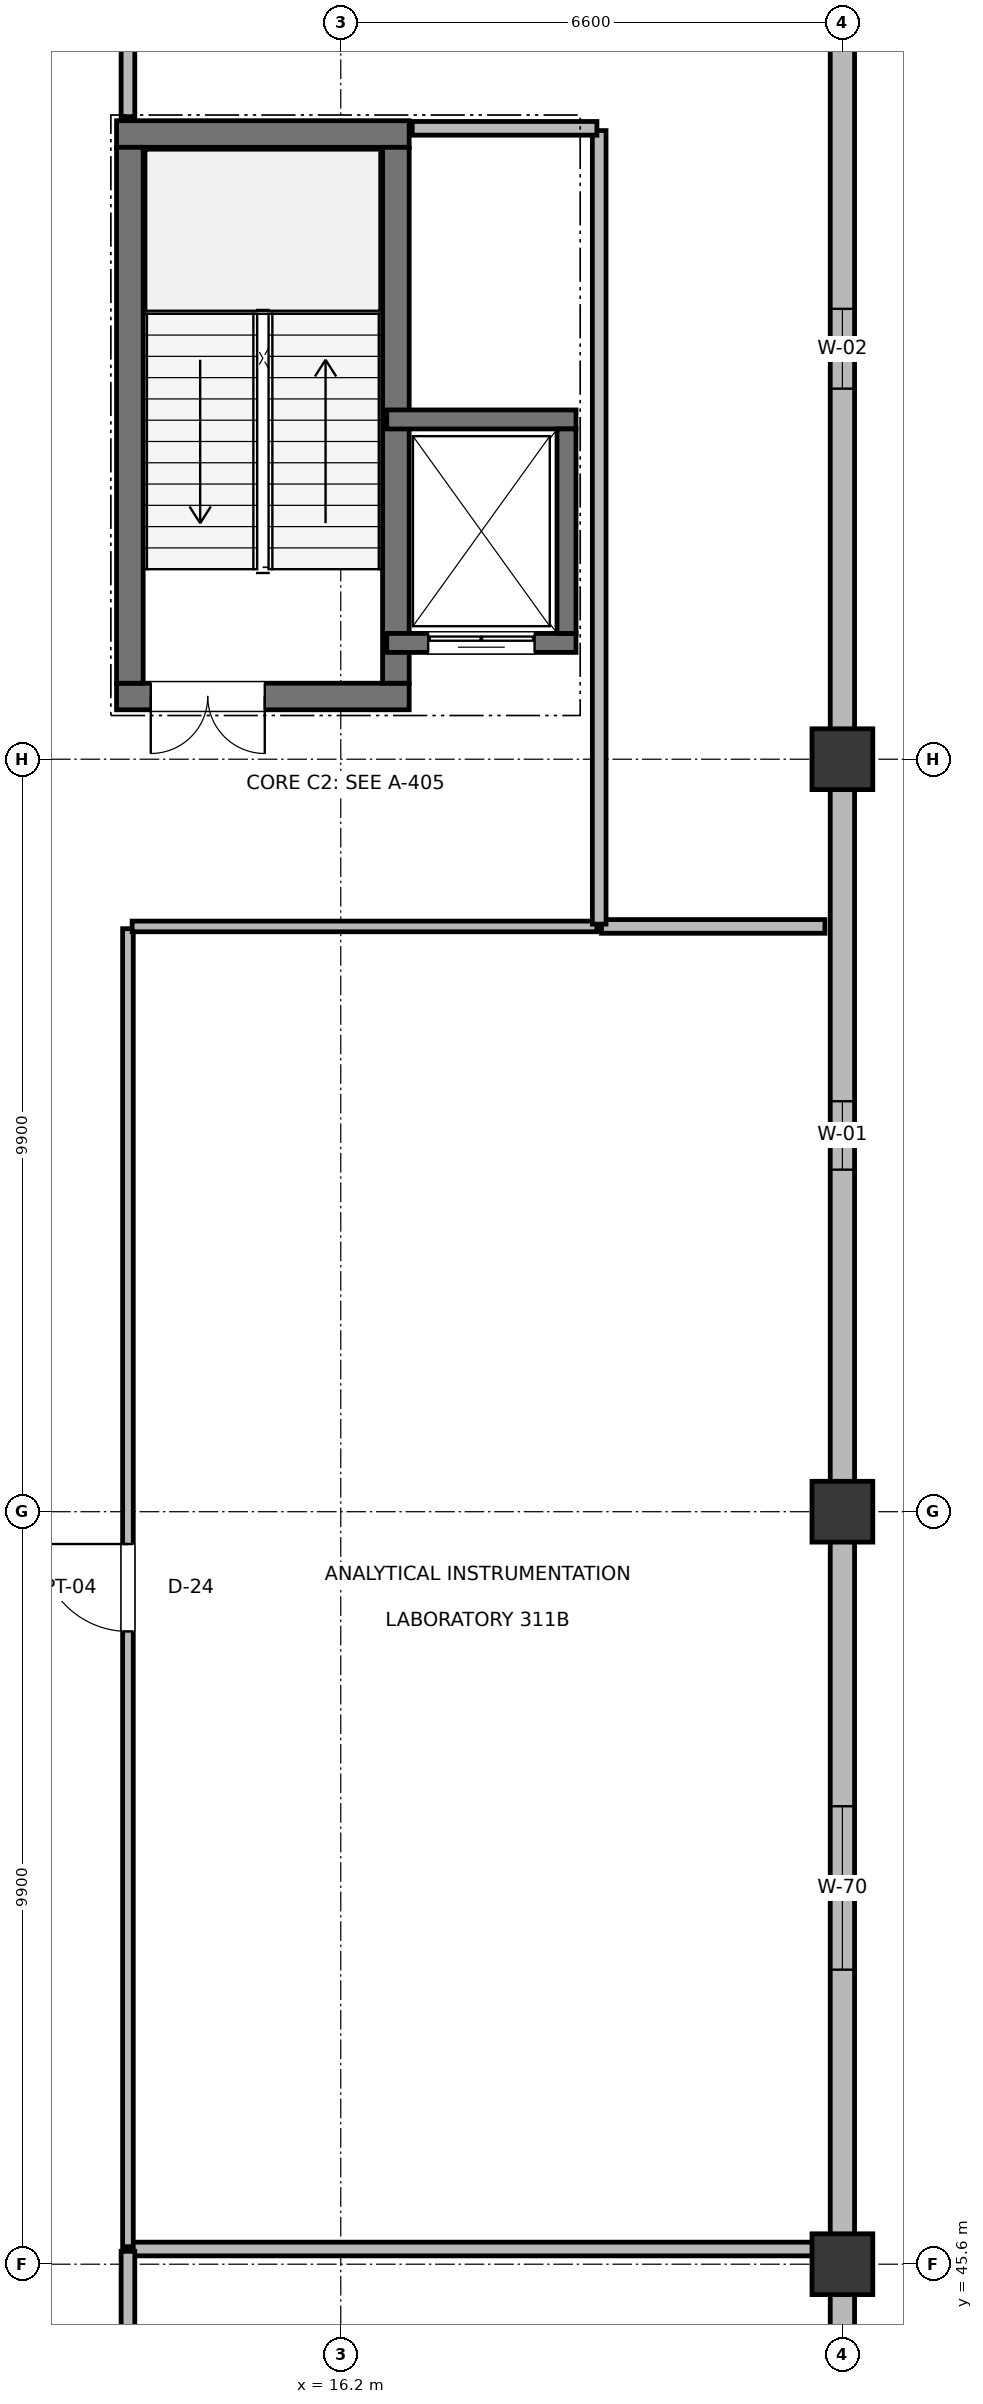
"""IFC4 building model, lengths in metres.
Left out: names, types, materials, properties, quantities, classifications, styles, units other than length and angle.
Written with IfcOpenShell. Run it as: python <this file> out.ifc"""

import sys

from ifc_helpers import new_model, si_unit, direction, frame, frame_2d, origin, origin_2d, place, context, subcontext, project, spatial, rectangle, extrude, element, fill, save


model = new_model("IFC4")
c1 = context("Model", 3, precision=1e-05, world=origin(), true_north=direction((0.0, 1.0)))
c2 = subcontext(c1, "Body", "Model", "MODEL_VIEW")
j1 = project(units=[si_unit("LENGTHUNIT", "METRE"), si_unit("PLANEANGLEUNIT", "RADIAN")], contexts=[c1])
p1 = place(None, origin())
s1 = spatial("IfcSite", under=j1, at=p1, CompositionType="ELEMENT")
p2 = place(p1, origin())
s2 = spatial("IfcBuilding", under=s1, at=p2, CompositionType="ELEMENT")
p3 = place(p2, frame((0.0, 0.0, 15.0)))
s3 = spatial("IfcBuildingStorey", under=s2, at=p3, CompositionType="ELEMENT", Elevation=15.0)
for number, where, z_axis, x_axis in (
    (1, (22.8, 45.6, 0.0), (0.0, 0.0, 1.0), (1.0, 0.0, 0.0)),
    (2, (22.8, 55.5, 0.0), (0.0, 0.0, 1.0), (1.0, 0.0, 0.0)),
    (3, (22.8, 65.4, 0.0), (0.0, 0.0, 1.0), (1.0, 0.0, 0.0)),
):
    element("IfcColumn", number, at=place(p3, frame(where, z_axis=z_axis, x_axis=x_axis)), inside=s3, PredefinedType="COLUMN", context=c2, shape_type="SweptSolid", body=[
        extrude(rectangle(XDim=0.8, YDim=0.8, at=origin_2d()), origin(), (0.0, 0.0, 1.0), 4.5),
    ])
p4 = place(p3, frame((22.8, 39.385, 0.0), z_axis=(0.0, 0.0, 1.0), x_axis=(0.0, 1.0, 0.0)))
e4 = element("IfcWall", 4, at=p4, inside=s3, PredefinedType="SOLIDWALL", context=c2, shape_type="SweptSolid", body=[
    extrude(rectangle(XDim=5.83, YDim=0.32, at=frame_2d((2.915, 0.0))), origin(), (0.0, 0.0, 1.0), 3.525),
])
p5 = place(p4, frame((1.84, 0.0, 0.9)))
e5 = element("IfcOpeningElement", 5, at=p5, cuts=e4, PredefinedType="OPENING", context=c2, shape_type="SweptSolid", body=[
    extrude(rectangle(XDim=2.15, YDim=1.15, at=frame_2d((1.075, 0.575))), frame((0.0, 0.17, 0.0), z_axis=(0.0, -1.0, 0.0), x_axis=(1.0, 0.0, 0.0)), (0.0, 0.0, 1.0), 0.34),
])
p6 = place(p3, frame((22.8, 45.985, 0.0), z_axis=(0.0, 0.0, 1.0), x_axis=(0.0, 1.0, 0.0)))
e6 = element("IfcWall", 6, at=p6, inside=s3, PredefinedType="SOLIDWALL", context=c2, shape_type="SweptSolid", body=[
    extrude(rectangle(XDim=9.13, YDim=0.32, at=frame_2d((4.565, 0.0))), origin(), (0.0, 0.0, 1.0), 3.325),
])
p7 = place(p6, frame((3.49, 0.0, 0.9)))
e7 = element("IfcOpeningElement", 7, at=p7, cuts=e6, PredefinedType="OPENING", context=c2, shape_type="SweptSolid", body=[
    extrude(rectangle(XDim=2.15, YDim=1.35, at=frame_2d((1.075, 0.675))), frame((0.0, 0.17, 0.0), z_axis=(0.0, -1.0, 0.0), x_axis=(1.0, 0.0, 0.0)), (0.0, 0.0, 1.0), 0.34),
])
p8 = place(p3, frame((22.8, 55.885, 0.0), z_axis=(0.0, 0.0, 1.0), x_axis=(0.0, 1.0, 0.0)))
e8 = element("IfcWall", 8, at=p8, inside=s3, PredefinedType="SOLIDWALL", context=c2, shape_type="SweptSolid", body=[
    extrude(rectangle(XDim=9.13, YDim=0.32, at=frame_2d((4.565, 0.0))), origin(), (0.0, 0.0, 1.0), 3.325),
])
p9 = place(p8, frame((4.115, 0.0, 0.9)))
e9 = element("IfcOpeningElement", 9, at=p9, cuts=e8, PredefinedType="OPENING", context=c2, shape_type="SweptSolid", body=[
    extrude(rectangle(XDim=0.9, YDim=1.8, at=frame_2d((0.45, 0.9))), frame((0.0, 0.17, 0.0), z_axis=(0.0, -1.0, 0.0), x_axis=(1.0, 0.0, 0.0)), (0.0, 0.0, 1.0), 0.34),
])
p10 = place(p3, frame((22.8, 65.785, 0.0), z_axis=(0.0, 0.0, 1.0), x_axis=(0.0, 1.0, 0.0)))
e10 = element("IfcWall", 10, at=p10, inside=s3, PredefinedType="SOLIDWALL", context=c2, shape_type="SweptSolid", body=[
    extrude(rectangle(XDim=10.03, YDim=0.32, at=frame_2d((5.015, 0.0))), origin(), (0.0, 0.0, 1.0), 3.325),
])
p11 = place(p10, frame((4.49, 0.0, 0.9)))
e11 = element("IfcOpeningElement", 11, at=p11, cuts=e10, PredefinedType="OPENING", context=c2, shape_type="SweptSolid", body=[
    extrude(rectangle(XDim=1.05, YDim=1.8, at=frame_2d((0.525, 0.9))), frame((0.0, 0.17, 0.0), z_axis=(0.0, -1.0, 0.0), x_axis=(1.0, 0.0, 0.0)), (0.0, 0.0, 1.0), 0.34),
])
p12 = place(p3, frame((13.25, 66.225, 0.0), z_axis=(0.0, 0.0, 1.0), x_axis=(1.0, 0.0, 0.0)))
e12 = element("IfcWall", 12, at=p12, inside=s3, PredefinedType="SHEAR", context=c2, shape_type="SweptSolid", body=[
    extrude(rectangle(XDim=3.85, YDim=0.35, at=frame_2d((1.925, 0.0))), origin(), (0.0, 0.0, 1.0), 4.28),
])
p13 = place(p12, frame((0.45, 0.0, 0.0)))
e13 = element("IfcOpeningElement", 13, at=p13, cuts=e12, PredefinedType="OPENING", context=c2, shape_type="SweptSolid", body=[
    extrude(rectangle(XDim=1.5, YDim=2.2, at=frame_2d((0.75, 1.1))), frame((0.0, 0.185, 0.0), z_axis=(0.0, -1.0, 0.0), x_axis=(1.0, 0.0, 0.0)), (0.0, 0.0, 1.0), 0.37),
])
p14 = place(p3, frame((13.25, 73.625, 0.0), z_axis=(0.0, 0.0, 1.0), x_axis=(1.0, 0.0, 0.0)))
e14 = element("IfcWall", 14, at=p14, inside=s3, PredefinedType="SHEAR", context=c2, shape_type="SweptSolid", body=[
    extrude(rectangle(XDim=3.85, YDim=0.35, at=frame_2d((1.925, 0.0))), origin(), (0.0, 0.0, 1.0), 4.28),
])
for number, where, z_axis, x_axis in (
    (15, (13.425, 66.4, 0.0), (0.0, 0.0, 1.0), (0.0, 1.0, 0.0)),
    (16, (16.925, 66.4, 0.0), (0.0, 0.0, 1.0), (0.0, 1.0, 0.0)),
):
    element("IfcWall", number, at=place(p3, frame(where, z_axis=z_axis, x_axis=x_axis)), inside=s3, PredefinedType="SHEAR", context=c2, shape_type="SweptSolid", body=[
        extrude(rectangle(XDim=7.05, YDim=0.35, at=frame_2d((3.525, 0.0))), origin(), (0.0, 0.0, 1.0), 4.28),
    ])
p15 = place(p3, frame((16.805, 66.93, 0.0), z_axis=(0.0, 0.0, 1.0), x_axis=(1.0, 0.0, 0.0)))
e17 = element("IfcWall", 17, at=p15, inside=s3, PredefinedType="SHEAR", context=c2, shape_type="SweptSolid", body=[
    extrude(rectangle(XDim=2.49, YDim=0.25, at=frame_2d((1.245, 0.0))), origin(), (0.0, 0.0, 1.0), 4.26),
])
p16 = place(p15, frame((0.545, 0.0, 0.0)))
e18 = element("IfcOpeningElement", 18, at=p16, cuts=e17, PredefinedType="OPENING", context=c2, shape_type="SweptSolid", body=[
    extrude(rectangle(XDim=1.4, YDim=2.3, at=frame_2d((0.7, 1.15))), frame((0.0, 0.135, 0.0), z_axis=(0.0, -1.0, 0.0), x_axis=(1.0, 0.0, 0.0)), (0.0, 0.0, 1.0), 0.27),
])
p17 = place(p3, frame((16.805, 69.87, 0.0), z_axis=(0.0, 0.0, 1.0), x_axis=(1.0, 0.0, 0.0)))
e19 = element("IfcWall", 19, at=p17, inside=s3, PredefinedType="SHEAR", context=c2, shape_type="SweptSolid", body=[
    extrude(rectangle(XDim=2.49, YDim=0.25, at=frame_2d((1.245, 0.0))), origin(), (0.0, 0.0, 1.0), 4.26),
])
p18 = place(p3, frame((19.17, 67.055, 0.0), z_axis=(0.0, 0.0, 1.0), x_axis=(0.0, 1.0, 0.0)))
e20 = element("IfcWall", 20, at=p18, inside=s3, PredefinedType="SHEAR", context=c2, shape_type="SweptSolid", body=[
    extrude(rectangle(XDim=2.69, YDim=0.25, at=frame_2d((1.345, 0.0))), origin(), (0.0, 0.0, 1.0), 4.26),
])
p19 = place(p3, frame((13.43, 45.8, 0.0), z_axis=(0.0, 0.0, 1.0), x_axis=(1.0, 0.0, 0.0)))
e21 = element("IfcWall", 21, at=p19, inside=s3, PredefinedType="PARTITIONING", context=c2, shape_type="SweptSolid", body=[
    extrude(rectangle(XDim=9.14, YDim=0.18, at=frame_2d((4.57, 0.0))), origin(), (0.0, 0.0, 1.0), 3.295),
])
p20 = place(p3, frame((13.4, 30.03, 0.0), z_axis=(0.0, 0.0, 1.0), x_axis=(0.0, 1.0, 0.0)))
e22 = element("IfcWall", 22, at=p20, inside=s3, PredefinedType="PARTITIONING", context=c2, shape_type="SweptSolid", body=[
    extrude(rectangle(XDim=15.74, YDim=0.18, at=frame_2d((7.87, 0.0))), origin(), (0.0, 0.0, 1.0), 3.295),
])
p21 = place(p20, frame((7.17, 0.0, 0.0)))
e23 = element("IfcOpeningElement", 23, at=p21, cuts=e22, PredefinedType="OPENING", context=c2, shape_type="SweptSolid", body=[
    extrude(rectangle(XDim=1.4, YDim=2.2, at=frame_2d((0.7, 1.1))), frame((0.0, 0.1, 0.0), z_axis=(0.0, -1.0, 0.0), x_axis=(1.0, 0.0, 0.0)), (0.0, 0.0, 1.0), 0.2),
])
p22 = place(p3, frame((19.63, 63.2, 0.0), z_axis=(0.0, 0.0, 1.0), x_axis=(1.0, 0.0, 0.0)))
e24 = element("IfcWall", 24, at=p22, inside=s3, PredefinedType="PARTITIONING", context=c2, shape_type="SweptSolid", body=[
    extrude(rectangle(XDim=2.94, YDim=0.18, at=frame_2d((1.47, 0.0))), origin(), (0.0, 0.0, 1.0), 3.325),
])
p23 = place(p3, frame((13.4, 45.83, 0.0), z_axis=(0.0, 0.0, 1.0), x_axis=(0.0, 1.0, 0.0)))
e25 = element("IfcWall", 25, at=p23, inside=s3, PredefinedType="PARTITIONING", context=c2, shape_type="SweptSolid", body=[
    extrude(rectangle(XDim=17.34, YDim=0.14, at=frame_2d((8.67, 0.0))), origin(), (0.0, 0.0, 1.0), 3.295),
])
p24 = place(p23, frame((8.095, 0.0, 0.0)))
e26 = element("IfcOpeningElement", 26, at=p24, cuts=e25, PredefinedType="OPENING", context=c2, shape_type="SweptSolid", body=[
    extrude(rectangle(XDim=1.15, YDim=2.15, at=frame_2d((0.575, 1.075))), frame((0.0, 0.08, 0.0), z_axis=(0.0, -1.0, 0.0), x_axis=(1.0, 0.0, 0.0)), (0.0, 0.0, 1.0), 0.16),
])
p25 = place(p3, frame((13.455, 63.2, 0.0), z_axis=(0.0, 0.0, 1.0), x_axis=(1.0, 0.0, 0.0)))
e27 = element("IfcWall", 27, at=p25, inside=s3, PredefinedType="PARTITIONING", context=c2, shape_type="SweptSolid", body=[
    extrude(rectangle(XDim=6.115, YDim=0.14, at=frame_2d((3.058, 0.0))), origin(), (0.0, 0.0, 1.0), 3.575),
])
p26 = place(p3, frame((13.4, 73.853, 0.0), z_axis=(0.0, 0.0, 1.0), x_axis=(0.0, 1.0, 0.0)))
e28 = element("IfcWall", 28, at=p26, inside=s3, PredefinedType="PARTITIONING", context=c2, shape_type="SweptSolid", body=[
    extrude(rectangle(XDim=11.117, YDim=0.18, at=frame_2d((5.558, 0.0))), origin(), (0.0, 0.0, 1.0), 3.335),
])
p27 = place(p26, frame((5.033, 0.0, 0.0)))
e29 = element("IfcOpeningElement", 29, at=p27, cuts=e28, PredefinedType="OPENING", context=c2, shape_type="SweptSolid", body=[
    extrude(rectangle(XDim=1.05, YDim=2.2, at=frame_2d((0.525, 1.1))), frame((0.0, 0.1, 0.0), z_axis=(0.0, -1.0, 0.0), x_axis=(1.0, 0.0, 0.0)), (0.0, 0.0, 1.0), 0.2),
])
p28 = place(p3, frame((19.6, 63.23, 0.0), z_axis=(0.0, 0.0, 1.0), x_axis=(0.0, 1.0, 0.0)))
e30 = element("IfcWall", 30, at=p28, inside=s3, PredefinedType="PARTITIONING", context=c2, shape_type="SweptSolid", body=[
    extrude(rectangle(XDim=10.44, YDim=0.18, at=frame_2d((5.22, 0.0))), origin(), (0.0, 0.0, 1.0), 3.455),
])
p29 = place(p3, frame((17.14, 73.7, 0.0), z_axis=(0.0, 0.0, 1.0), x_axis=(1.0, 0.0, 0.0)))
e31 = element("IfcWall", 31, at=p29, inside=s3, PredefinedType="PARTITIONING", context=c2, shape_type="SweptSolid", body=[
    extrude(rectangle(XDim=2.43, YDim=0.18, at=frame_2d((1.215, 0.0))), origin(), (0.0, 0.0, 1.0), 4.18),
])
p30 = place(p7, frame((2.15, 0.0, 0.0), z_axis=(0.0, 0.0, 1.0), x_axis=(-1.0, 0.0, 0.0)))
e32 = element("IfcWindow", 32, at=p30, inside=s3, PartitioningType="DOUBLE_PANEL_VERTICAL", PredefinedType="WINDOW", context=c2, shape_type="SweptSolid", body=[
    extrude(rectangle(XDim=2.15, YDim=1.35, at=frame_2d((1.075, 0.675))), frame((0.0, 0.03, 0.0), z_axis=(0.0, -1.0, 0.0), x_axis=(1.0, 0.0, 0.0)), (0.0, 0.0, 1.0), 0.06),
])
fill(e7, e32)
p31 = place(p9, frame((0.9, 0.0, 0.0), z_axis=(0.0, 0.0, 1.0), x_axis=(-1.0, 0.0, 0.0)))
e33 = element("IfcWindow", 33, at=p31, inside=s3, PartitioningType="SINGLE_PANEL", PredefinedType="WINDOW", context=c2, shape_type="SweptSolid", body=[
    extrude(rectangle(XDim=0.9, YDim=1.8, at=frame_2d((0.45, 0.9))), frame((0.0, 0.03, 0.0), z_axis=(0.0, -1.0, 0.0), x_axis=(1.0, 0.0, 0.0)), (0.0, 0.0, 1.0), 0.06),
])
fill(e9, e33)
p32 = place(p11, frame((1.05, 0.0, 0.0), z_axis=(0.0, 0.0, 1.0), x_axis=(-1.0, 0.0, 0.0)))
e34 = element("IfcWindow", 34, at=p32, inside=s3, PartitioningType="SINGLE_PANEL", PredefinedType="WINDOW", context=c2, shape_type="SweptSolid", body=[
    extrude(rectangle(XDim=1.05, YDim=1.8, at=frame_2d((0.525, 0.9))), frame((0.0, 0.03, 0.0), z_axis=(0.0, -1.0, 0.0), x_axis=(1.0, 0.0, 0.0)), (0.0, 0.0, 1.0), 0.06),
])
fill(e11, e34)
p33 = place(p13, frame((1.5, 0.0, 0.0), z_axis=(0.0, 0.0, 1.0), x_axis=(-1.0, 0.0, 0.0)))
e35 = element("IfcDoor", 35, at=p33, inside=s3, OperationType="DOUBLE_DOOR_SINGLE_SWING", PredefinedType="DOOR", context=c2, shape_type="SweptSolid", body=[
    extrude(rectangle(XDim=1.5, YDim=2.2, at=frame_2d((0.75, 1.1))), frame((0.0, 0.025, 0.0), z_axis=(0.0, -1.0, 0.0), x_axis=(1.0, 0.0, 0.0)), (0.0, 0.0, 1.0), 0.05),
])
fill(e13, e35)
p34 = place(p16, frame((1.4, 0.0, 0.0), z_axis=(0.0, 0.0, 1.0), x_axis=(-1.0, 0.0, 0.0)))
e36 = element("IfcDoor", 36, at=p34, inside=s3, OperationType="DOUBLE_DOOR_SLIDING", PredefinedType="DOOR", context=c2, shape_type="SweptSolid", body=[
    extrude(rectangle(XDim=1.4, YDim=2.3, at=frame_2d((0.7, 1.15))), frame((0.0, 0.025, 0.0), z_axis=(0.0, -1.0, 0.0), x_axis=(1.0, 0.0, 0.0)), (0.0, 0.0, 1.0), 0.05),
])
fill(e18, e36)
p35 = place(p24, origin())
e37 = element("IfcDoor", 37, at=p35, inside=s3, OperationType="SINGLE_SWING_RIGHT", PredefinedType="DOOR", context=c2, shape_type="SweptSolid", body=[
    extrude(rectangle(XDim=1.15, YDim=2.15, at=frame_2d((0.575, 1.075))), frame((0.0, 0.025, 0.0), z_axis=(0.0, -1.0, 0.0), x_axis=(1.0, 0.0, 0.0)), (0.0, 0.0, 1.0), 0.05),
])
fill(e26, e37)
save(model, sys.argv[1])
